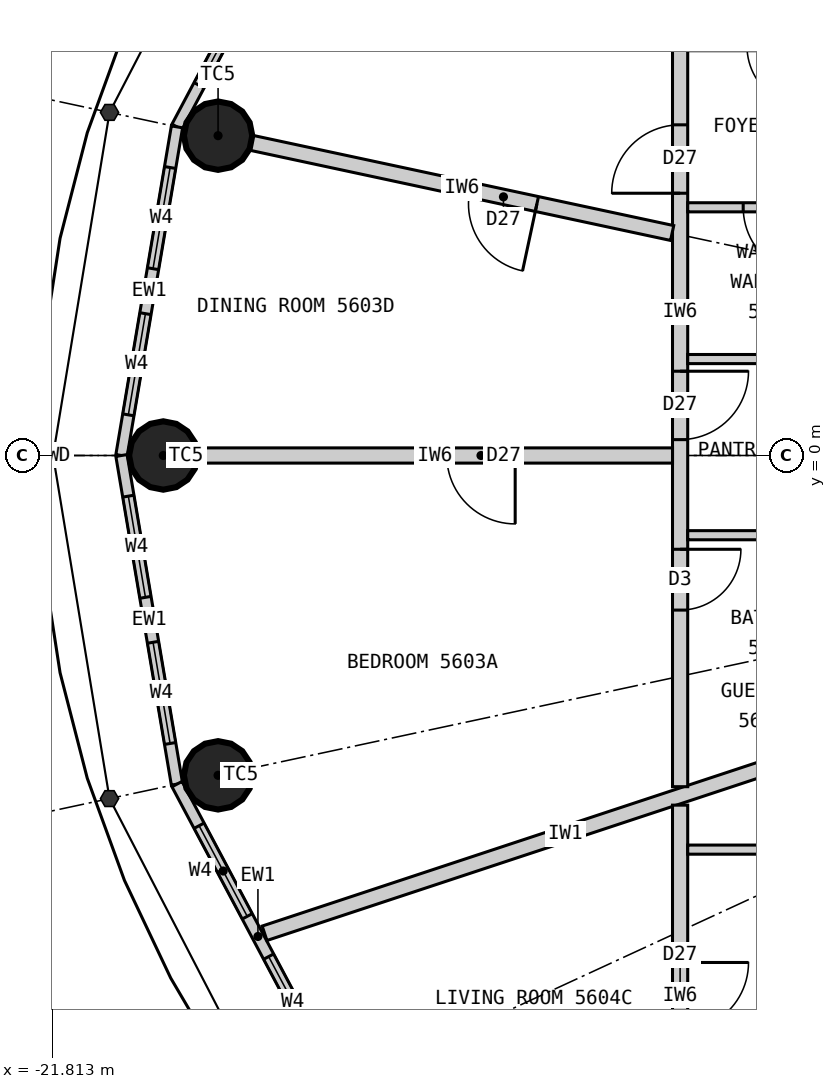
"""IFC4 building model, lengths in metres.
Left out: names, types, materials, properties, quantities, classifications, styles, units other than length and angle.
Written with IfcOpenShell. Run it as: python <this file> out.ifc"""

import sys

from ifc_helpers import new_model, si_unit, direction, frame, frame_2d, origin, origin_2d, place, context, subcontext, project, spatial, rectangle, circle, extrude, element, fill, save


model = new_model("IFC4")
c1 = context("Model", 3, precision=1e-05, world=origin(), true_north=direction((0.0, 1.0)))
c2 = subcontext(c1, "Body", "Model", "MODEL_VIEW")
j1 = project(units=[si_unit("LENGTHUNIT", "METRE"), si_unit("PLANEANGLEUNIT", "RADIAN")], contexts=[c1])
p1 = place(None, origin())
s1 = spatial("IfcSite", under=j1, at=p1, CompositionType="ELEMENT")
p2 = place(p1, origin())
s2 = spatial("IfcBuilding", under=s1, at=p2, CompositionType="ELEMENT")
p3 = place(p2, frame((0.0, 0.0, 209.4)))
s3 = spatial("IfcBuildingStorey", under=s2, at=p3, CompositionType="ELEMENT", Elevation=209.4)
for number, where, z_axis, x_axis in (
    (1, (-19.629, 4.208, 0.0), (0.0, 0.0, 1.0), (1.0, 0.0, 0.0)),
    (2, (-20.35, 0.0, 0.0), (0.0, 0.0, 1.0), (1.0, 0.0, 0.0)),
    (3, (-19.629, -4.208, 0.0), (0.0, 0.0, 1.0), (1.0, 0.0, 0.0)),
):
    element("IfcColumn", number, at=place(p3, frame(where, z_axis=z_axis, x_axis=x_axis)), inside=s3, PredefinedType="COLUMN", context=c2, shape_type="SweptSolid", body=[
        extrude(circle(Radius=0.45, at=origin_2d()), origin(), (0.0, 0.0, 1.0), 3.3),
    ])
p4 = place(p3, frame((-18.04, 8.332, 0.0), z_axis=(0.0, 0.0, 1.0), x_axis=(-0.469256152955, -0.883062094597, 0.0)))
e4 = element("IfcWall", 4, at=p4, inside=s3, PredefinedType="ELEMENTEDWALL", context=c2, shape_type="SweptSolid", body=[
    extrude(rectangle(XDim=4.539, YDim=0.15, at=frame_2d((2.27, 0.0))), origin(), (0.0, 0.0, 1.0), 3.12),
])
p5 = place(p4, frame((0.62, 0.0, 0.9)))
e5 = element("IfcOpeningElement", 5, at=p5, cuts=e4, PredefinedType="OPENING", context=c2, shape_type="SweptSolid", body=[
    extrude(rectangle(XDim=1.35, YDim=1.9, at=frame_2d((0.675, 0.95))), frame((0.0, 0.085, 0.0), z_axis=(0.0, -1.0, 0.0), x_axis=(1.0, 0.0, 0.0)), (0.0, 0.0, 1.0), 0.17),
])
p6 = place(p4, frame((2.57, 0.0, 0.9)))
e6 = element("IfcOpeningElement", 6, at=p6, cuts=e4, PredefinedType="OPENING", context=c2, shape_type="SweptSolid", body=[
    extrude(rectangle(XDim=1.35, YDim=1.9, at=frame_2d((0.675, 0.95))), frame((0.0, 0.085, 0.0), z_axis=(0.0, -1.0, 0.0), x_axis=(1.0, 0.0, 0.0)), (0.0, 0.0, 1.0), 0.17),
])
p7 = place(p3, frame((-20.17, 4.323, 0.0), z_axis=(0.0, 0.0, 1.0), x_axis=(-0.166538513568, -0.986034950445, 0.0)))
e7 = element("IfcWall", 7, at=p7, inside=s3, PredefinedType="ELEMENTEDWALL", context=c2, shape_type="SweptSolid", body=[
    extrude(rectangle(XDim=4.385, YDim=0.15, at=frame_2d((2.192, 0.0))), origin(), (0.0, 0.0, 1.0), 3.12),
])
p8 = place(p7, frame((0.542, 0.0, 0.9)))
e8 = element("IfcOpeningElement", 8, at=p8, cuts=e7, PredefinedType="OPENING", context=c2, shape_type="SweptSolid", body=[
    extrude(rectangle(XDim=1.35, YDim=1.9, at=frame_2d((0.675, 0.95))), frame((0.0, 0.085, 0.0), z_axis=(0.0, -1.0, 0.0), x_axis=(1.0, 0.0, 0.0)), (0.0, 0.0, 1.0), 0.17),
])
p9 = place(p7, frame((2.492, 0.0, 0.9)))
e9 = element("IfcOpeningElement", 9, at=p9, cuts=e7, PredefinedType="OPENING", context=c2, shape_type="SweptSolid", body=[
    extrude(rectangle(XDim=1.35, YDim=1.9, at=frame_2d((0.675, 0.95))), frame((0.0, 0.085, 0.0), z_axis=(0.0, -1.0, 0.0), x_axis=(1.0, 0.0, 0.0)), (0.0, 0.0, 1.0), 0.17),
])
p10 = place(p3, frame((-20.9, 0.0, 0.0), z_axis=(0.0, 0.0, 1.0), x_axis=(0.166538513568, -0.986034950445, 0.0)))
e10 = element("IfcWall", 10, at=p10, inside=s3, PredefinedType="ELEMENTEDWALL", context=c2, shape_type="SweptSolid", body=[
    extrude(rectangle(XDim=4.385, YDim=0.15, at=frame_2d((2.192, 0.0))), origin(), (0.0, 0.0, 1.0), 3.12),
])
p11 = place(p10, frame((0.542, 0.0, 0.9)))
e11 = element("IfcOpeningElement", 11, at=p11, cuts=e10, PredefinedType="OPENING", context=c2, shape_type="SweptSolid", body=[
    extrude(rectangle(XDim=1.35, YDim=1.9, at=frame_2d((0.675, 0.95))), frame((0.0, 0.085, 0.0), z_axis=(0.0, -1.0, 0.0), x_axis=(1.0, 0.0, 0.0)), (0.0, 0.0, 1.0), 0.17),
])
p12 = place(p10, frame((2.492, 0.0, 0.9)))
e12 = element("IfcOpeningElement", 12, at=p12, cuts=e10, PredefinedType="OPENING", context=c2, shape_type="SweptSolid", body=[
    extrude(rectangle(XDim=1.35, YDim=1.9, at=frame_2d((0.675, 0.95))), frame((0.0, 0.085, 0.0), z_axis=(0.0, -1.0, 0.0), x_axis=(1.0, 0.0, 0.0)), (0.0, 0.0, 1.0), 0.17),
])
p13 = place(p3, frame((-20.17, -4.323, 0.0), z_axis=(0.0, 0.0, 1.0), x_axis=(0.469256152955, -0.883062094597, 0.0)))
e13 = element("IfcWall", 13, at=p13, inside=s3, PredefinedType="ELEMENTEDWALL", context=c2, shape_type="SweptSolid", body=[
    extrude(rectangle(XDim=4.539, YDim=0.15, at=frame_2d((2.27, 0.0))), origin(), (0.0, 0.0, 1.0), 3.12),
])
p14 = place(p13, frame((0.62, 0.0, 0.9)))
e14 = element("IfcOpeningElement", 14, at=p14, cuts=e13, PredefinedType="OPENING", context=c2, shape_type="SweptSolid", body=[
    extrude(rectangle(XDim=1.35, YDim=1.9, at=frame_2d((0.675, 0.95))), frame((0.0, 0.085, 0.0), z_axis=(0.0, -1.0, 0.0), x_axis=(1.0, 0.0, 0.0)), (0.0, 0.0, 1.0), 0.17),
])
p15 = place(p13, frame((2.57, 0.0, 0.9)))
e15 = element("IfcOpeningElement", 15, at=p15, cuts=e13, PredefinedType="OPENING", context=c2, shape_type="SweptSolid", body=[
    extrude(rectangle(XDim=1.35, YDim=1.9, at=frame_2d((0.675, 0.95))), frame((0.0, 0.085, 0.0), z_axis=(0.0, -1.0, 0.0), x_axis=(1.0, 0.0, 0.0)), (0.0, 0.0, 1.0), 0.17),
])
p16 = place(p3, frame((-11.1, -3.669, 0.0), z_axis=(0.0, 0.0, 1.0), x_axis=(-0.949476668397, -0.313837627079, 0.0)))
e16 = element("IfcWall", 16, at=p16, inside=s3, PredefinedType="PARTITIONING", context=c2, shape_type="SweptSolid", body=[
    extrude(rectangle(XDim=8.339, YDim=0.2, at=frame_2d((4.169, 0.0))), origin(), (0.0, 0.0, 1.0), 3.12),
])
p17 = place(p3, frame((-13.55, 8.139, 0.0), z_axis=(0.0, 0.0, 1.0), x_axis=(0.0, -1.0, 0.0)))
e17 = element("IfcWall", 17, at=p17, inside=s3, PredefinedType="PARTITIONING", context=c2, shape_type="SweptSolid", body=[
    extrude(rectangle(XDim=12.496, YDim=0.2, at=frame_2d((6.248, 0.0))), origin(), (0.0, 0.0, 1.0), 3.12),
])
p18 = place(p17, frame((7.031, 0.0, 0.0)))
e18 = element("IfcOpeningElement", 18, at=p18, cuts=e17, PredefinedType="OPENING", context=c2, shape_type="SweptSolid", body=[
    extrude(rectangle(XDim=0.9, YDim=2.1, at=frame_2d((0.45, 1.05))), frame((0.0, 0.11, 0.0), z_axis=(0.0, -1.0, 0.0), x_axis=(1.0, 0.0, 0.0)), (0.0, 0.0, 1.0), 0.22),
])
p19 = place(p17, frame((9.373, 0.0, 0.0)))
e19 = element("IfcOpeningElement", 19, at=p19, cuts=e17, PredefinedType="OPENING", context=c2, shape_type="SweptSolid", body=[
    extrude(rectangle(XDim=0.8, YDim=2.1, at=frame_2d((0.4, 1.05))), frame((0.0, 0.11, 0.0), z_axis=(0.0, -1.0, 0.0), x_axis=(1.0, 0.0, 0.0)), (0.0, 0.0, 1.0), 0.22),
])
p20 = place(p17, frame((3.789, 0.0, 0.0)))
e20 = element("IfcOpeningElement", 20, at=p20, cuts=e17, PredefinedType="OPENING", context=c2, shape_type="SweptSolid", body=[
    extrude(rectangle(XDim=0.9, YDim=2.1, at=frame_2d((0.45, 1.05))), frame((0.0, 0.11, 0.0), z_axis=(0.0, -1.0, 0.0), x_axis=(1.0, 0.0, 0.0)), (0.0, 0.0, 1.0), 0.22),
])
p21 = place(p3, frame((-13.655, 2.927, 0.0), z_axis=(0.0, 0.0, 1.0), x_axis=(-0.977790419294, 0.209585056568, 0.0)))
e21 = element("IfcWall", 21, at=p21, inside=s3, PredefinedType="PARTITIONING", context=c2, shape_type="SweptSolid", body=[
    extrude(rectangle(XDim=5.66, YDim=0.2, at=frame_2d((2.83, 0.0))), origin(), (0.0, 0.0, 1.0), 2.42),
])
p22 = place(p21, frame((1.82, 0.0, 0.0)))
e22 = element("IfcOpeningElement", 22, at=p22, cuts=e21, PredefinedType="OPENING", context=c2, shape_type="SweptSolid", body=[
    extrude(rectangle(XDim=0.9, YDim=2.1, at=frame_2d((0.45, 1.05))), frame((0.0, 0.11, 0.0), z_axis=(0.0, -1.0, 0.0), x_axis=(1.0, 0.0, 0.0)), (0.0, 0.0, 1.0), 0.22),
])
p23 = place(p3, frame((-13.65, 0.0, 0.0), z_axis=(0.0, 0.0, 1.0), x_axis=(-1.0, 0.0, 0.0)))
e23 = element("IfcWall", 23, at=p23, inside=s3, PredefinedType="PARTITIONING", context=c2, shape_type="SweptSolid", body=[
    extrude(rectangle(XDim=6.25, YDim=0.2, at=frame_2d((3.125, 0.0))), origin(), (0.0, 0.0, 1.0), 2.37),
])
p24 = place(p23, frame((2.07, 0.0, 0.0)))
e24 = element("IfcOpeningElement", 24, at=p24, cuts=e23, PredefinedType="OPENING", context=c2, shape_type="SweptSolid", body=[
    extrude(rectangle(XDim=0.9, YDim=2.1, at=frame_2d((0.45, 1.05))), frame((0.0, 0.11, 0.0), z_axis=(0.0, -1.0, 0.0), x_axis=(1.0, 0.0, 0.0)), (0.0, 0.0, 1.0), 0.22),
])
p25 = place(p3, frame((-11.1, 3.265, 0.0), z_axis=(0.0, 0.0, 1.0), x_axis=(-1.0, 0.0, 0.0)))
e25 = element("IfcWall", 25, at=p25, inside=s3, PredefinedType="PARTITIONING", context=c2, shape_type="SweptSolid", body=[
    extrude(rectangle(XDim=2.35, YDim=0.12, at=frame_2d((1.175, 0.0))), origin(), (0.0, 0.0, 1.0), 2.42),
])
p26 = place(p25, frame((0.72, 0.0, 0.0)))
e26 = element("IfcOpeningElement", 26, at=p26, cuts=e25, PredefinedType="OPENING", context=c2, shape_type="SweptSolid", body=[
    extrude(rectangle(XDim=0.9, YDim=2.1, at=frame_2d((0.45, 1.05))), frame((0.0, 0.07, 0.0), z_axis=(0.0, -1.0, 0.0), x_axis=(1.0, 0.0, 0.0)), (0.0, 0.0, 1.0), 0.14),
])
for number, where, z_axis, x_axis in (
    (27, (-11.1, 1.269, 0.0), (0.0, 0.0, 1.0), (-1.0, 0.0, 0.0)),
    (28, (-11.1, -1.049, 0.0), (0.0, 0.0, 1.0), (-1.0, 0.0, 0.0)),
):
    element("IfcWall", number, at=place(p3, frame(where, z_axis=z_axis, x_axis=x_axis)), inside=s3, PredefinedType="PARTITIONING", context=c2, shape_type="SweptSolid", body=[
        extrude(rectangle(XDim=2.35, YDim=0.12, at=frame_2d((1.175, 0.0))), origin(), (0.0, 0.0, 1.0), 3.12),
    ])
p27 = place(p3, frame((-13.55, -4.6, 0.0), z_axis=(0.0, 0.0, 1.0), x_axis=(0.0, -1.0, 0.0)))
e29 = element("IfcWall", 29, at=p27, inside=s3, PredefinedType="PARTITIONING", context=c2, shape_type="SweptSolid", body=[
    extrude(rectangle(XDim=5.009, YDim=0.2, at=frame_2d((2.504, 0.0))), origin(), (0.0, 0.0, 1.0), 3.12),
])
p28 = place(p27, frame((2.07, 0.0, 0.0)))
e30 = element("IfcOpeningElement", 30, at=p28, cuts=e29, PredefinedType="OPENING", context=c2, shape_type="SweptSolid", body=[
    extrude(rectangle(XDim=0.9, YDim=2.1, at=frame_2d((0.45, 1.05))), frame((0.0, 0.11, 0.0), z_axis=(0.0, -1.0, 0.0), x_axis=(1.0, 0.0, 0.0)), (0.0, 0.0, 1.0), 0.22),
])
p29 = place(p3, frame((-11.1, -5.185, 0.0), z_axis=(0.0, 0.0, 1.0), x_axis=(-1.0, 0.0, 0.0)))
e31 = element("IfcWall", 31, at=p29, inside=s3, PredefinedType="PARTITIONING", context=c2, shape_type="SweptSolid", body=[
    extrude(rectangle(XDim=2.35, YDim=0.12, at=frame_2d((1.175, 0.0))), origin(), (0.0, 0.0, 1.0), 3.12),
])
p30 = place(p29, frame((0.57, 0.0, 0.0)))
e32 = element("IfcOpeningElement", 32, at=p30, cuts=e31, PredefinedType="OPENING", context=c2, shape_type="SweptSolid", body=[
    extrude(rectangle(XDim=0.8, YDim=2.1, at=frame_2d((0.4, 1.05))), frame((0.0, 0.07, 0.0), z_axis=(0.0, -1.0, 0.0), x_axis=(1.0, 0.0, 0.0)), (0.0, 0.0, 1.0), 0.14),
])
p31 = place(p6, origin())
e33 = element("IfcWindow", 33, at=p31, inside=s3, PartitioningType="SINGLE_PANEL", PredefinedType="WINDOW", context=c2, shape_type="SweptSolid", body=[
    extrude(rectangle(XDim=1.35, YDim=1.9, at=frame_2d((0.675, 0.95))), frame((0.0, 0.03, 0.0), z_axis=(0.0, -1.0, 0.0), x_axis=(1.0, 0.0, 0.0)), (0.0, 0.0, 1.0), 0.06),
])
fill(e6, e33)
p32 = place(p8, origin())
e34 = element("IfcWindow", 34, at=p32, inside=s3, PartitioningType="SINGLE_PANEL", PredefinedType="WINDOW", context=c2, shape_type="SweptSolid", body=[
    extrude(rectangle(XDim=1.35, YDim=1.9, at=frame_2d((0.675, 0.95))), frame((0.0, 0.03, 0.0), z_axis=(0.0, -1.0, 0.0), x_axis=(1.0, 0.0, 0.0)), (0.0, 0.0, 1.0), 0.06),
])
fill(e8, e34)
p33 = place(p9, origin())
e35 = element("IfcWindow", 35, at=p33, inside=s3, PartitioningType="SINGLE_PANEL", PredefinedType="WINDOW", context=c2, shape_type="SweptSolid", body=[
    extrude(rectangle(XDim=1.35, YDim=1.9, at=frame_2d((0.675, 0.95))), frame((0.0, 0.03, 0.0), z_axis=(0.0, -1.0, 0.0), x_axis=(1.0, 0.0, 0.0)), (0.0, 0.0, 1.0), 0.06),
])
fill(e9, e35)
p34 = place(p11, origin())
e36 = element("IfcWindow", 36, at=p34, inside=s3, PartitioningType="SINGLE_PANEL", PredefinedType="WINDOW", context=c2, shape_type="SweptSolid", body=[
    extrude(rectangle(XDim=1.35, YDim=1.9, at=frame_2d((0.675, 0.95))), frame((0.0, 0.03, 0.0), z_axis=(0.0, -1.0, 0.0), x_axis=(1.0, 0.0, 0.0)), (0.0, 0.0, 1.0), 0.06),
])
fill(e11, e36)
p35 = place(p12, origin())
e37 = element("IfcWindow", 37, at=p35, inside=s3, PartitioningType="SINGLE_PANEL", PredefinedType="WINDOW", context=c2, shape_type="SweptSolid", body=[
    extrude(rectangle(XDim=1.35, YDim=1.9, at=frame_2d((0.675, 0.95))), frame((0.0, 0.03, 0.0), z_axis=(0.0, -1.0, 0.0), x_axis=(1.0, 0.0, 0.0)), (0.0, 0.0, 1.0), 0.06),
])
fill(e12, e37)
p36 = place(p14, origin())
e38 = element("IfcWindow", 38, at=p36, inside=s3, PartitioningType="SINGLE_PANEL", PredefinedType="WINDOW", context=c2, shape_type="SweptSolid", body=[
    extrude(rectangle(XDim=1.35, YDim=1.9, at=frame_2d((0.675, 0.95))), frame((0.0, 0.03, 0.0), z_axis=(0.0, -1.0, 0.0), x_axis=(1.0, 0.0, 0.0)), (0.0, 0.0, 1.0), 0.06),
])
fill(e14, e38)
p37 = place(p15, origin())
e39 = element("IfcWindow", 39, at=p37, inside=s3, PartitioningType="SINGLE_PANEL", PredefinedType="WINDOW", context=c2, shape_type="SweptSolid", body=[
    extrude(rectangle(XDim=1.35, YDim=1.9, at=frame_2d((0.675, 0.95))), frame((0.0, 0.03, 0.0), z_axis=(0.0, -1.0, 0.0), x_axis=(1.0, 0.0, 0.0)), (0.0, 0.0, 1.0), 0.06),
])
fill(e15, e39)
p38 = place(p26, origin())
e40 = element("IfcDoor", 40, at=p38, inside=s3, OperationType="SINGLE_SWING_LEFT", PredefinedType="DOOR", context=c2, shape_type="SweptSolid", body=[
    extrude(rectangle(XDim=0.9, YDim=2.1, at=frame_2d((0.45, 1.05))), frame((0.0, 0.025, 0.0), z_axis=(0.0, -1.0, 0.0), x_axis=(1.0, 0.0, 0.0)), (0.0, 0.0, 1.0), 0.05),
])
fill(e26, e40)
p39 = place(p18, origin())
e41 = element("IfcDoor", 41, at=p39, inside=s3, OperationType="SINGLE_SWING_LEFT", PredefinedType="DOOR", context=c2, shape_type="SweptSolid", body=[
    extrude(rectangle(XDim=0.9, YDim=2.1, at=frame_2d((0.45, 1.05))), frame((0.0, 0.025, 0.0), z_axis=(0.0, -1.0, 0.0), x_axis=(1.0, 0.0, 0.0)), (0.0, 0.0, 1.0), 0.05),
])
fill(e18, e41)
p40 = place(p19, origin())
e42 = element("IfcDoor", 42, at=p40, inside=s3, OperationType="SINGLE_SWING_LEFT", PredefinedType="DOOR", context=c2, shape_type="SweptSolid", body=[
    extrude(rectangle(XDim=0.8, YDim=2.1, at=frame_2d((0.4, 1.05))), frame((0.0, 0.025, 0.0), z_axis=(0.0, -1.0, 0.0), x_axis=(1.0, 0.0, 0.0)), (0.0, 0.0, 1.0), 0.05),
])
fill(e19, e42)
p41 = place(p20, origin())
e43 = element("IfcDoor", 43, at=p41, inside=s3, OperationType="SINGLE_SWING_RIGHT", PredefinedType="DOOR", context=c2, shape_type="SweptSolid", body=[
    extrude(rectangle(XDim=0.9, YDim=2.1, at=frame_2d((0.45, 1.05))), frame((0.0, 0.025, 0.0), z_axis=(0.0, -1.0, 0.0), x_axis=(1.0, 0.0, 0.0)), (0.0, 0.0, 1.0), 0.05),
])
fill(e20, e43)
p42 = place(p22, origin())
e44 = element("IfcDoor", 44, at=p42, inside=s3, OperationType="SINGLE_SWING_LEFT", PredefinedType="DOOR", context=c2, shape_type="SweptSolid", body=[
    extrude(rectangle(XDim=0.9, YDim=2.1, at=frame_2d((0.45, 1.05))), frame((0.0, 0.025, 0.0), z_axis=(0.0, -1.0, 0.0), x_axis=(1.0, 0.0, 0.0)), (0.0, 0.0, 1.0), 0.05),
])
fill(e22, e44)
p43 = place(p24, origin())
e45 = element("IfcDoor", 45, at=p43, inside=s3, OperationType="SINGLE_SWING_LEFT", PredefinedType="DOOR", context=c2, shape_type="SweptSolid", body=[
    extrude(rectangle(XDim=0.9, YDim=2.1, at=frame_2d((0.45, 1.05))), frame((0.0, 0.025, 0.0), z_axis=(0.0, -1.0, 0.0), x_axis=(1.0, 0.0, 0.0)), (0.0, 0.0, 1.0), 0.05),
])
fill(e24, e45)
p44 = place(p28, origin())
e46 = element("IfcDoor", 46, at=p44, inside=s3, OperationType="SINGLE_SWING_LEFT", PredefinedType="DOOR", context=c2, shape_type="SweptSolid", body=[
    extrude(rectangle(XDim=0.9, YDim=2.1, at=frame_2d((0.45, 1.05))), frame((0.0, 0.025, 0.0), z_axis=(0.0, -1.0, 0.0), x_axis=(1.0, 0.0, 0.0)), (0.0, 0.0, 1.0), 0.05),
])
fill(e30, e46)
save(model, sys.argv[1])
